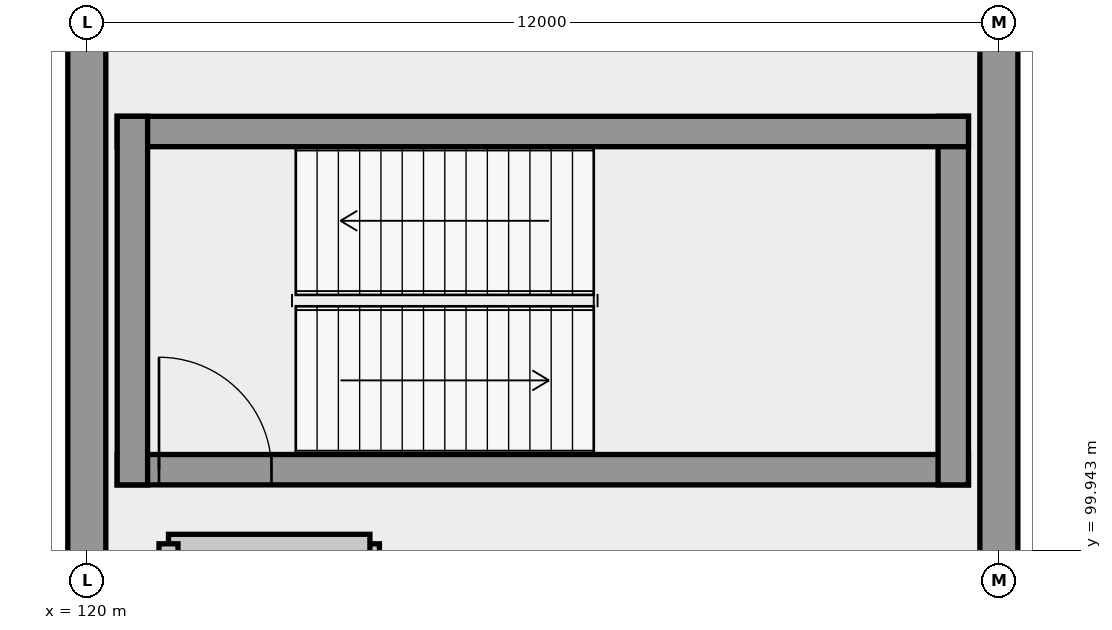
"""IFC4 building model, lengths in metres.
Left out: names, types, materials, properties, quantities, classifications, styles, units other than length and angle.
Written with IfcOpenShell. Run it as: python <this file> out.ifc"""

import sys

from ifc_helpers import new_model, si_unit, direction, frame, frame_2d, origin, place, context, subcontext, project, spatial, rectangle, extrude, element, fill, save


model = new_model("IFC4")
c1 = context("Model", 3, precision=1e-05, world=origin(), true_north=direction((0.0, 1.0)))
c2 = subcontext(c1, "Body", "Model", "MODEL_VIEW")
j1 = project(units=[si_unit("LENGTHUNIT", "METRE"), si_unit("PLANEANGLEUNIT", "RADIAN")], contexts=[c1])
p1 = place(None, origin())
s1 = spatial("IfcSite", under=j1, at=p1, CompositionType="ELEMENT")
p2 = place(p1, origin())
s2 = spatial("IfcBuilding", under=s1, at=p2, CompositionType="ELEMENT")
p3 = place(p2, frame((0.0, 0.0, -5.4)))
s3 = spatial("IfcBuildingStorey", under=s2, at=p3, CompositionType="ELEMENT", Elevation=-5.4)
for number, where, z_axis, x_axis in (
    (1, (120.0, 108.0, 0.0), (0.0, 0.0, 1.0), (0.0, -1.0, 0.0)),
    (2, (132.0, 96.0, 0.0), (0.0, 0.0, 1.0), (0.0, 1.0, 0.0)),
):
    element("IfcWall", number, at=place(p3, frame(where, z_axis=z_axis, x_axis=x_axis)), inside=s3, PredefinedType="USERDEFINED", context=c2, shape_type="SweptSolid", body=[
        extrude(rectangle(XDim=12.0, YDim=0.5, at=frame_2d((6.0, 0.0))), origin(), (0.0, 0.0, 1.0), 4.54),
    ])
p4 = place(p3, frame((120.4, 101.0, 0.0), z_axis=(0.0, 0.0, 1.0), x_axis=(1.0, 0.0, 0.0)))
e3 = element("IfcWall", 3, at=p4, inside=s3, PredefinedType="SHEAR", context=c2, shape_type="SweptSolid", body=[
    extrude(rectangle(XDim=11.2, YDim=0.4, at=frame_2d((5.6, 0.0))), origin(), (0.0, 0.0, 1.0), 5.12),
])
p5 = place(p4, frame((0.55, 0.0, 0.0)))
e4 = element("IfcOpeningElement", 4, at=p5, cuts=e3, PredefinedType="OPENING", context=c2, shape_type="SweptSolid", body=[
    extrude(rectangle(XDim=1.48, YDim=2.3, at=frame_2d((0.74, 1.15))), frame((0.0, 0.21, 0.0), z_axis=(0.0, -1.0, 0.0), x_axis=(1.0, 0.0, 0.0)), (0.0, 0.0, 1.0), 0.42),
])
p6 = place(p3, frame((131.4, 100.8, 0.0), z_axis=(0.0, 0.0, 1.0), x_axis=(0.0, 1.0, 0.0)))
e5 = element("IfcWall", 5, at=p6, inside=s3, PredefinedType="SHEAR", context=c2, shape_type="SweptSolid", body=[
    extrude(rectangle(XDim=4.85, YDim=0.4, at=frame_2d((2.425, 0.0))), origin(), (0.0, 0.0, 1.0), 5.12),
])
p7 = place(p3, frame((131.6, 105.45, 0.0), z_axis=(0.0, 0.0, 1.0), x_axis=(-1.0, 0.0, 0.0)))
e6 = element("IfcWall", 6, at=p7, inside=s3, PredefinedType="SHEAR", context=c2, shape_type="SweptSolid", body=[
    extrude(rectangle(XDim=11.2, YDim=0.4, at=frame_2d((5.6, 0.0))), origin(), (0.0, 0.0, 1.0), 5.12),
])
p8 = place(p3, frame((120.6, 105.65, 0.0), z_axis=(0.0, 0.0, 1.0), x_axis=(0.0, -1.0, 0.0)))
e7 = element("IfcWall", 7, at=p8, inside=s3, PredefinedType="SHEAR", context=c2, shape_type="SweptSolid", body=[
    extrude(rectangle(XDim=4.85, YDim=0.4, at=frame_2d((2.425, 0.0))), origin(), (0.0, 0.0, 1.0), 5.12),
])
p9 = place(p3, frame((123.725, 96.775, 0.0), z_axis=(0.0, 0.0, 1.0), x_axis=(0.0, 1.0, 0.0)))
e8 = element("IfcWall", 8, at=p9, inside=s3, PredefinedType="SOLIDWALL", context=c2, shape_type="SweptSolid", body=[
    extrude(rectangle(XDim=3.25, YDim=0.25, at=frame_2d((1.625, 0.0))), origin(), (0.0, 0.0, 1.0), 5.12),
])
p10 = place(p9, frame((0.925, 0.0, 0.0)))
e9 = element("IfcOpeningElement", 9, at=p10, cuts=e8, PredefinedType="OPENING", context=c2, shape_type="SweptSolid", body=[
    extrude(rectangle(XDim=1.4, YDim=2.3, at=frame_2d((0.7, 1.15))), frame((0.0, 0.135, 0.0), z_axis=(0.0, -1.0, 0.0), x_axis=(1.0, 0.0, 0.0)), (0.0, 0.0, 1.0), 0.27),
])
p11 = place(p3, frame((123.725, 100.025, 0.0), z_axis=(0.0, 0.0, 1.0), x_axis=(-1.0, 0.0, 0.0)))
e10 = element("IfcWall", 10, at=p11, inside=s3, PredefinedType="SOLIDWALL", context=c2, shape_type="SweptSolid", body=[
    extrude(rectangle(XDim=2.65, YDim=0.25, at=frame_2d((1.325, 0.0))), origin(), (0.0, 0.0, 1.0), 5.12),
])
p12 = place(p3, frame((121.075, 100.025, 0.0), z_axis=(0.0, 0.0, 1.0), x_axis=(0.0, -1.0, 0.0)))
e11 = element("IfcWall", 11, at=p12, inside=s3, PredefinedType="SOLIDWALL", context=c2, shape_type="SweptSolid", body=[
    extrude(rectangle(XDim=3.25, YDim=0.25, at=frame_2d((1.625, 0.0))), origin(), (0.0, 0.0, 1.0), 5.12),
])
p13 = place(p5, origin())
e12 = element("IfcDoor", 12, at=p13, inside=s3, OperationType="DOUBLE_DOOR_SINGLE_SWING", PredefinedType="DOOR", context=c2, shape_type="SweptSolid", body=[
    extrude(rectangle(XDim=1.48, YDim=2.3, at=frame_2d((0.74, 1.15))), frame((0.0, 0.025, 0.0), z_axis=(0.0, -1.0, 0.0), x_axis=(1.0, 0.0, 0.0)), (0.0, 0.0, 1.0), 0.05),
])
fill(e4, e12)
save(model, sys.argv[1])
